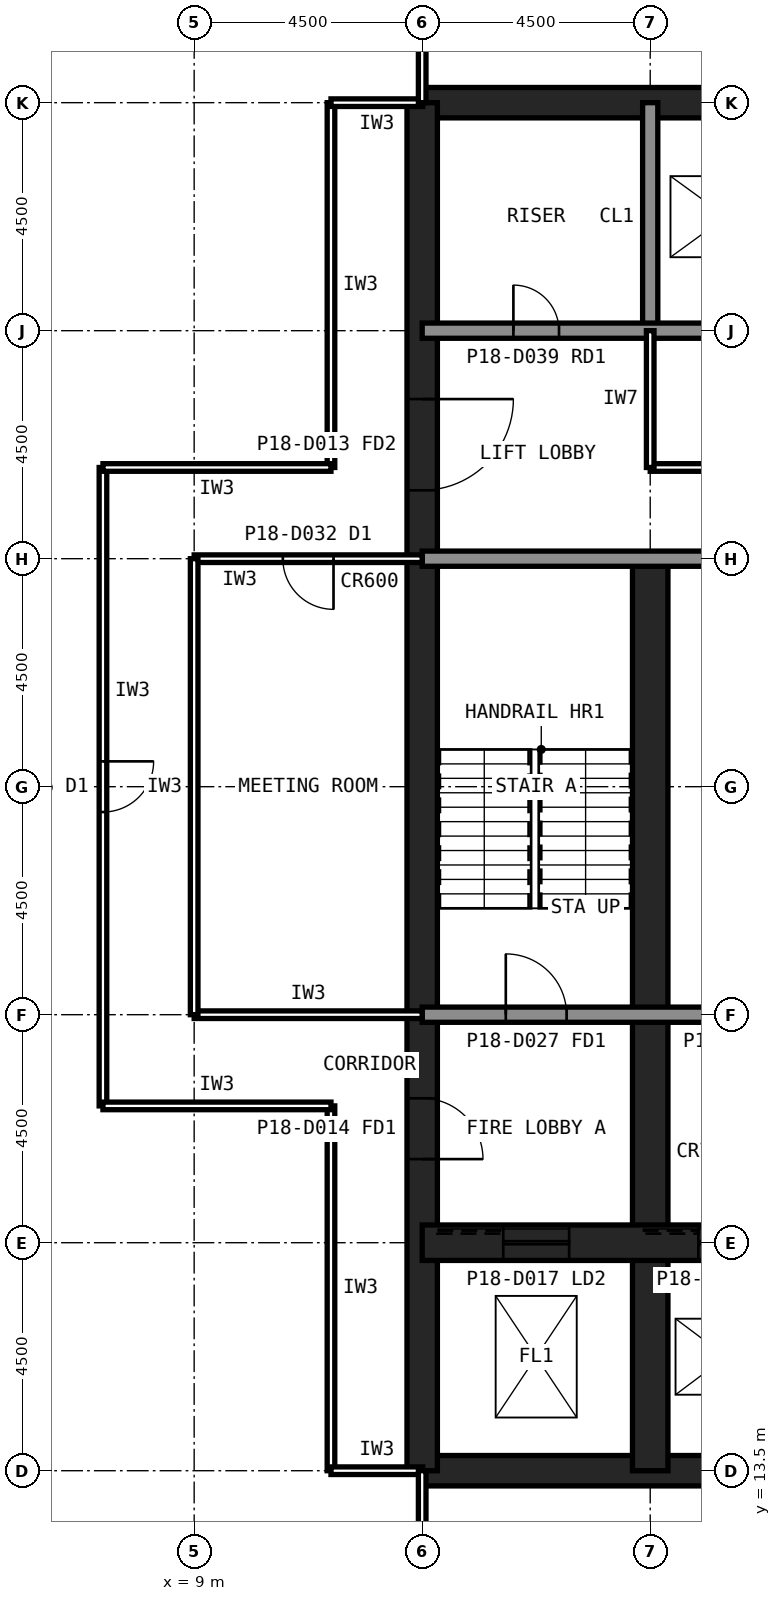
"""IFC4 building model, lengths in metres.
Left out: names, types, materials, properties, quantities, classifications, styles, units other than length and angle.
Written with IfcOpenShell. Run it as: python <this file> out.ifc"""

import sys

from ifc_helpers import new_model, si_unit, direction, frame, frame_2d, origin, place, context, subcontext, project, spatial, rectangle, extrude, element, fill, save


model = new_model("IFC4")
c1 = context("Model", 3, precision=1e-05, world=origin(), true_north=direction((0.0, 1.0)))
c2 = subcontext(c1, "Body", "Model", "MODEL_VIEW")
j1 = project(units=[si_unit("LENGTHUNIT", "METRE"), si_unit("PLANEANGLEUNIT", "RADIAN")], contexts=[c1])
p1 = place(None, origin())
s1 = spatial("IfcSite", under=j1, at=p1, CompositionType="ELEMENT")
p2 = place(p1, origin())
s2 = spatial("IfcBuilding", under=s1, at=p2, CompositionType="ELEMENT")
p3 = place(p2, frame((0.0, 0.0, 79.4)))
s3 = spatial("IfcBuildingStorey", under=s2, at=p3, CompositionType="ELEMENT", Elevation=79.4)
for number, where, z_axis, x_axis in (
    (1, (13.5, 13.5, 0.0), (0.0, 0.0, 1.0), (1.0, 0.0, 0.0)),
    (2, (40.5, 40.5, 0.0), (0.0, 0.0, 1.0), (-1.0, 0.0, 0.0)),
):
    element("IfcWall", number, at=place(p3, frame(where, z_axis=z_axis, x_axis=x_axis)), inside=s3, PredefinedType="SHEAR", context=c2, shape_type="SweptSolid", body=[
        extrude(rectangle(XDim=27.0, YDim=0.6, at=frame_2d((13.5, 0.0))), origin(), (0.0, 0.0, 1.0), 4.2),
    ])
p4 = place(p3, frame((13.5, 40.5, 0.0), z_axis=(0.0, 0.0, 1.0), x_axis=(0.0, -1.0, 0.0)))
e3 = element("IfcWall", 3, at=p4, inside=s3, PredefinedType="SHEAR", context=c2, shape_type="SweptSolid", body=[
    extrude(rectangle(XDim=27.0, YDim=0.6, at=frame_2d((13.5, 0.0))), origin(), (0.0, 0.0, 1.0), 4.2),
])
p5 = place(p4, frame((19.65, 0.0, 0.0)))
e4 = element("IfcOpeningElement", 4, at=p5, cuts=e3, PredefinedType="OPENING", context=c2, shape_type="SweptSolid", body=[
    extrude(rectangle(XDim=1.2, YDim=2.1, at=frame_2d((0.6, 1.05))), frame((0.0, 0.31, 0.0), z_axis=(0.0, -1.0, 0.0), x_axis=(1.0, 0.0, 0.0)), (0.0, 0.0, 1.0), 0.62),
])
p6 = place(p4, frame((5.85, 0.0, 0.0)))
e5 = element("IfcOpeningElement", 5, at=p6, cuts=e3, PredefinedType="OPENING", context=c2, shape_type="SweptSolid", body=[
    extrude(rectangle(XDim=1.8, YDim=2.1, at=frame_2d((0.9, 1.05))), frame((0.0, 0.31, 0.0), z_axis=(0.0, -1.0, 0.0), x_axis=(1.0, 0.0, 0.0)), (0.0, 0.0, 1.0), 0.62),
])
p7 = place(p3, frame((18.0, 13.5, 0.0), z_axis=(0.0, 0.0, 1.0), x_axis=(0.0, 1.0, 0.0)))
e6 = element("IfcWall", 6, at=p7, inside=s3, PredefinedType="SHEAR", context=c2, shape_type="SweptSolid", body=[
    extrude(rectangle(XDim=18.0, YDim=0.7, at=frame_2d((9.0, 0.0))), origin(), (0.0, 0.0, 1.0), 4.2),
])
p8 = place(p3, frame((18.0, 36.0, 0.0), z_axis=(0.0, 0.0, 1.0), x_axis=(0.0, 1.0, 0.0)))
e7 = element("IfcWall", 7, at=p8, inside=s3, PredefinedType="SOLIDWALL", context=c2, shape_type="SweptSolid", body=[
    extrude(rectangle(XDim=4.5, YDim=0.3, at=frame_2d((2.25, 0.0))), origin(), (0.0, 0.0, 1.0), 4.04),
])
p9 = place(p3, frame((13.5, 18.0, 0.0), z_axis=(0.0, 0.0, 1.0), x_axis=(1.0, 0.0, 0.0)))
e8 = element("IfcWall", 8, at=p9, inside=s3, PredefinedType="SHEAR", context=c2, shape_type="SweptSolid", body=[
    extrude(rectangle(XDim=27.0, YDim=0.7, at=frame_2d((13.5, 0.0))), origin(), (0.0, 0.0, 1.0), 4.2),
])
p10 = place(p9, frame((24.3, 0.0, 0.0)))
e9 = element("IfcOpeningElement", 9, at=p10, cuts=e8, PredefinedType="OPENING", context=c2, shape_type="SweptSolid", body=[
    extrude(rectangle(XDim=0.9, YDim=2.1, at=frame_2d((0.45, 1.05))), frame((0.0, 0.36, 0.0), z_axis=(0.0, -1.0, 0.0), x_axis=(1.0, 0.0, 0.0)), (0.0, 0.0, 1.0), 0.72),
])
p11 = place(p9, frame((5.45, 0.0, 0.0)))
e10 = element("IfcOpeningElement", 10, at=p11, cuts=e8, PredefinedType="OPENING", context=c2, shape_type="SweptSolid", body=[
    extrude(rectangle(XDim=1.1, YDim=2.1, at=frame_2d((0.55, 1.05))), frame((0.0, 0.36, 0.0), z_axis=(0.0, -1.0, 0.0), x_axis=(1.0, 0.0, 0.0)), (0.0, 0.0, 1.0), 0.72),
])
p12 = place(p9, frame((8.45, 0.0, 0.0)))
e11 = element("IfcOpeningElement", 11, at=p12, cuts=e8, PredefinedType="OPENING", context=c2, shape_type="SweptSolid", body=[
    extrude(rectangle(XDim=1.1, YDim=2.1, at=frame_2d((0.55, 1.05))), frame((0.0, 0.36, 0.0), z_axis=(0.0, -1.0, 0.0), x_axis=(1.0, 0.0, 0.0)), (0.0, 0.0, 1.0), 0.72),
])
p13 = place(p9, frame((11.45, 0.0, 0.0)))
e12 = element("IfcOpeningElement", 12, at=p13, cuts=e8, PredefinedType="OPENING", context=c2, shape_type="SweptSolid", body=[
    extrude(rectangle(XDim=1.1, YDim=2.1, at=frame_2d((0.55, 1.05))), frame((0.0, 0.36, 0.0), z_axis=(0.0, -1.0, 0.0), x_axis=(1.0, 0.0, 0.0)), (0.0, 0.0, 1.0), 0.72),
])
p14 = place(p9, frame((14.45, 0.0, 0.0)))
e13 = element("IfcOpeningElement", 13, at=p14, cuts=e8, PredefinedType="OPENING", context=c2, shape_type="SweptSolid", body=[
    extrude(rectangle(XDim=1.1, YDim=2.1, at=frame_2d((0.55, 1.05))), frame((0.0, 0.36, 0.0), z_axis=(0.0, -1.0, 0.0), x_axis=(1.0, 0.0, 0.0)), (0.0, 0.0, 1.0), 0.72),
])
p15 = place(p9, frame((17.45, 0.0, 0.0)))
e14 = element("IfcOpeningElement", 14, at=p15, cuts=e8, PredefinedType="OPENING", context=c2, shape_type="SweptSolid", body=[
    extrude(rectangle(XDim=1.1, YDim=2.1, at=frame_2d((0.55, 1.05))), frame((0.0, 0.36, 0.0), z_axis=(0.0, -1.0, 0.0), x_axis=(1.0, 0.0, 0.0)), (0.0, 0.0, 1.0), 0.72),
])
p16 = place(p9, frame((20.45, 0.0, 0.0)))
e15 = element("IfcOpeningElement", 15, at=p16, cuts=e8, PredefinedType="OPENING", context=c2, shape_type="SweptSolid", body=[
    extrude(rectangle(XDim=1.1, YDim=2.1, at=frame_2d((0.55, 1.05))), frame((0.0, 0.36, 0.0), z_axis=(0.0, -1.0, 0.0), x_axis=(1.0, 0.0, 0.0)), (0.0, 0.0, 1.0), 0.72),
])
p17 = place(p9, frame((1.6, 0.0, 0.0)))
e16 = element("IfcOpeningElement", 16, at=p17, cuts=e8, PredefinedType="OPENING", context=c2, shape_type="SweptSolid", body=[
    extrude(rectangle(XDim=1.3, YDim=2.2, at=frame_2d((0.65, 1.1))), frame((0.0, 0.36, 0.0), z_axis=(0.0, -1.0, 0.0), x_axis=(1.0, 0.0, 0.0)), (0.0, 0.0, 1.0), 0.72),
])
p18 = place(p3, frame((13.5, 36.0, 0.0), z_axis=(0.0, 0.0, 1.0), x_axis=(1.0, 0.0, 0.0)))
e17 = element("IfcWall", 17, at=p18, inside=s3, PredefinedType="SOLIDWALL", context=c2, shape_type="SweptSolid", body=[
    extrude(rectangle(XDim=27.0, YDim=0.3, at=frame_2d((13.5, 0.0))), origin(), (0.0, 0.0, 1.0), 4.04),
])
p19 = place(p18, frame((1.8, 0.0, 0.0)))
e18 = element("IfcOpeningElement", 18, at=p19, cuts=e17, PredefinedType="OPENING", context=c2, shape_type="SweptSolid", body=[
    extrude(rectangle(XDim=0.9, YDim=2.1, at=frame_2d((0.45, 1.05))), frame((0.0, 0.16, 0.0), z_axis=(0.0, -1.0, 0.0), x_axis=(1.0, 0.0, 0.0)), (0.0, 0.0, 1.0), 0.32),
])
p20 = place(p18, frame((24.1, 0.0, 0.0)))
e19 = element("IfcOpeningElement", 19, at=p20, cuts=e17, PredefinedType="OPENING", context=c2, shape_type="SweptSolid", body=[
    extrude(rectangle(XDim=1.3, YDim=2.2, at=frame_2d((0.65, 1.1))), frame((0.0, 0.16, 0.0), z_axis=(0.0, -1.0, 0.0), x_axis=(1.0, 0.0, 0.0)), (0.0, 0.0, 1.0), 0.32),
])
p21 = place(p3, frame((13.5, 22.5, 0.0), z_axis=(0.0, 0.0, 1.0), x_axis=(1.0, 0.0, 0.0)))
e20 = element("IfcWall", 20, at=p21, inside=s3, PredefinedType="SOLIDWALL", context=c2, shape_type="SweptSolid", body=[
    extrude(rectangle(XDim=27.0, YDim=0.3, at=frame_2d((13.5, 0.0))), origin(), (0.0, 0.0, 1.0), 4.04),
])
p22 = place(p21, frame((1.65, 0.0, 0.0)))
e21 = element("IfcOpeningElement", 21, at=p22, cuts=e20, PredefinedType="OPENING", context=c2, shape_type="SweptSolid", body=[
    extrude(rectangle(XDim=1.2, YDim=2.1, at=frame_2d((0.6, 1.05))), frame((0.0, 0.16, 0.0), z_axis=(0.0, -1.0, 0.0), x_axis=(1.0, 0.0, 0.0)), (0.0, 0.0, 1.0), 0.32),
])
p23 = place(p21, frame((6.025, 0.0, 0.0)))
e22 = element("IfcOpeningElement", 22, at=p23, cuts=e20, PredefinedType="OPENING", context=c2, shape_type="SweptSolid", body=[
    extrude(rectangle(XDim=1.0, YDim=2.1, at=frame_2d((0.5, 1.05))), frame((0.0, 0.16, 0.0), z_axis=(0.0, -1.0, 0.0), x_axis=(1.0, 0.0, 0.0)), (0.0, 0.0, 1.0), 0.32),
])
p24 = place(p21, frame((10.525, 0.0, 0.0)))
e23 = element("IfcOpeningElement", 23, at=p24, cuts=e20, PredefinedType="OPENING", context=c2, shape_type="SweptSolid", body=[
    extrude(rectangle(XDim=1.0, YDim=2.1, at=frame_2d((0.5, 1.05))), frame((0.0, 0.16, 0.0), z_axis=(0.0, -1.0, 0.0), x_axis=(1.0, 0.0, 0.0)), (0.0, 0.0, 1.0), 0.32),
])
p25 = place(p21, frame((19.75, 0.0, 0.0)))
e24 = element("IfcOpeningElement", 24, at=p25, cuts=e20, PredefinedType="OPENING", context=c2, shape_type="SweptSolid", body=[
    extrude(rectangle(XDim=1.0, YDim=2.1, at=frame_2d((0.5, 1.05))), frame((0.0, 0.16, 0.0), z_axis=(0.0, -1.0, 0.0), x_axis=(1.0, 0.0, 0.0)), (0.0, 0.0, 1.0), 0.32),
])
p26 = place(p21, frame((15.05, 0.0, 0.0)))
e25 = element("IfcOpeningElement", 25, at=p26, cuts=e20, PredefinedType="OPENING", context=c2, shape_type="SweptSolid", body=[
    extrude(rectangle(XDim=1.4, YDim=2.4, at=frame_2d((0.7, 1.2))), frame((0.0, 0.16, 0.0), z_axis=(0.0, -1.0, 0.0), x_axis=(1.0, 0.0, 0.0)), (0.0, 0.0, 1.0), 0.32),
])
p27 = place(p3, frame((13.5, 31.5, 0.0), z_axis=(0.0, 0.0, 1.0), x_axis=(1.0, 0.0, 0.0)))
e26 = element("IfcWall", 26, at=p27, inside=s3, PredefinedType="SOLIDWALL", context=c2, shape_type="SweptSolid", body=[
    extrude(rectangle(XDim=27.0, YDim=0.3, at=frame_2d((13.5, 0.0))), origin(), (0.0, 0.0, 1.0), 4.04),
])
p28 = place(p27, frame((24.15, 0.0, 0.0)))
e27 = element("IfcOpeningElement", 27, at=p28, cuts=e26, PredefinedType="OPENING", context=c2, shape_type="SweptSolid", body=[
    extrude(rectangle(XDim=1.2, YDim=2.1, at=frame_2d((0.6, 1.05))), frame((0.0, 0.16, 0.0), z_axis=(0.0, -1.0, 0.0), x_axis=(1.0, 0.0, 0.0)), (0.0, 0.0, 1.0), 0.32),
])
p29 = place(p27, frame((15.3, 0.0, 0.0)))
e28 = element("IfcOpeningElement", 28, at=p29, cuts=e26, PredefinedType="OPENING", context=c2, shape_type="SweptSolid", body=[
    extrude(rectangle(XDim=0.9, YDim=2.1, at=frame_2d((0.45, 1.05))), frame((0.0, 0.16, 0.0), z_axis=(0.0, -1.0, 0.0), x_axis=(1.0, 0.0, 0.0)), (0.0, 0.0, 1.0), 0.32),
])
p30 = place(p27, frame((19.8, 0.0, 0.0)))
e29 = element("IfcOpeningElement", 29, at=p30, cuts=e26, PredefinedType="OPENING", context=c2, shape_type="SweptSolid", body=[
    extrude(rectangle(XDim=0.9, YDim=2.1, at=frame_2d((0.45, 1.05))), frame((0.0, 0.16, 0.0), z_axis=(0.0, -1.0, 0.0), x_axis=(1.0, 0.0, 0.0)), (0.0, 0.0, 1.0), 0.32),
])
p31 = place(p3, frame((18.0, 33.3, 0.0), z_axis=(0.0, 0.0, 1.0), x_axis=(1.0, 0.0, 0.0)))
e30 = element("IfcWall", 30, at=p31, inside=s3, PredefinedType="PARTITIONING", context=c2, shape_type="SweptSolid", body=[
    extrude(rectangle(XDim=18.0, YDim=0.15, at=frame_2d((9.0, 0.0))), origin(), (0.0, 0.0, 1.0), 4.04),
])
p32 = place(p31, frame((5.55, 0.0, 0.0)))
e31 = element("IfcOpeningElement", 31, at=p32, cuts=e30, PredefinedType="OPENING", context=c2, shape_type="SweptSolid", body=[
    extrude(rectangle(XDim=0.9, YDim=2.1, at=frame_2d((0.45, 1.05))), frame((0.0, 0.085, 0.0), z_axis=(0.0, -1.0, 0.0), x_axis=(1.0, 0.0, 0.0)), (0.0, 0.0, 1.0), 0.17),
])
p33 = place(p31, frame((14.55, 0.0, 0.0)))
e32 = element("IfcOpeningElement", 32, at=p33, cuts=e30, PredefinedType="OPENING", context=c2, shape_type="SweptSolid", body=[
    extrude(rectangle(XDim=0.9, YDim=2.1, at=frame_2d((0.45, 1.05))), frame((0.0, 0.085, 0.0), z_axis=(0.0, -1.0, 0.0), x_axis=(1.0, 0.0, 0.0)), (0.0, 0.0, 1.0), 0.17),
])
p34 = place(p3, frame((18.0, 33.3, 0.0), z_axis=(0.0, 0.0, 1.0), x_axis=(0.0, 1.0, 0.0)))
e33 = element("IfcWall", 33, at=p34, inside=s3, PredefinedType="PARTITIONING", context=c2, shape_type="SweptSolid", body=[
    extrude(rectangle(XDim=2.7, YDim=0.15, at=frame_2d((1.35, 0.0))), origin(), (0.0, 0.0, 1.0), 4.04),
])
p35 = place(p3, frame((7.2, 33.3, 0.0), z_axis=(0.0, 0.0, 1.0), x_axis=(0.0, -1.0, 0.0)))
e34 = element("IfcWall", 34, at=p35, inside=s3, PredefinedType="PARTITIONING", context=c2, shape_type="SweptSolid", body=[
    extrude(rectangle(XDim=12.6, YDim=0.15, at=frame_2d((6.3, 0.0))), origin(), (0.0, 0.0, 1.0), 4.04),
])
p36 = place(p35, frame((5.8, 0.0, 0.0)))
e35 = element("IfcOpeningElement", 35, at=p36, cuts=e34, PredefinedType="OPENING", context=c2, shape_type="SweptSolid", body=[
    extrude(rectangle(XDim=1.0, YDim=2.1, at=frame_2d((0.5, 1.05))), frame((0.0, 0.085, 0.0), z_axis=(0.0, -1.0, 0.0), x_axis=(1.0, 0.0, 0.0)), (0.0, 0.0, 1.0), 0.17),
])
for number, where, z_axis, x_axis in (
    (36, (11.7, 20.7, 0.0), (0.0, 0.0, 1.0), (0.0, -1.0, 0.0)),
    (37, (11.7, 40.5, 0.0), (0.0, 0.0, 1.0), (0.0, -1.0, 0.0)),
):
    element("IfcWall", number, at=place(p3, frame(where, z_axis=z_axis, x_axis=x_axis)), inside=s3, PredefinedType="PARTITIONING", context=c2, shape_type="SweptSolid", body=[
        extrude(rectangle(XDim=7.2, YDim=0.15, at=frame_2d((3.6, 0.0))), origin(), (0.0, 0.0, 1.0), 4.04),
    ])
for number, where, z_axis, x_axis in (
    (38, (7.2, 20.7, 0.0), (0.0, 0.0, 1.0), (1.0, 0.0, 0.0)),
    (39, (11.7, 33.3, 0.0), (0.0, 0.0, 1.0), (-1.0, 0.0, 0.0)),
):
    element("IfcWall", number, at=place(p3, frame(where, z_axis=z_axis, x_axis=x_axis)), inside=s3, PredefinedType="PARTITIONING", context=c2, shape_type="SweptSolid", body=[
        extrude(rectangle(XDim=4.5, YDim=0.15, at=frame_2d((2.25, 0.0))), origin(), (0.0, 0.0, 1.0), 4.04),
    ])
for number, where, z_axis, x_axis in (
    (40, (11.7, 13.5, 0.0), (0.0, 0.0, 1.0), (1.0, 0.0, 0.0)),
    (41, (13.51, 40.5, 0.0), (0.0, 0.0, 1.0), (-1.0, 0.0, 0.0)),
):
    element("IfcWall", number, at=place(p3, frame(where, z_axis=z_axis, x_axis=x_axis)), inside=s3, PredefinedType="PARTITIONING", context=c2, shape_type="SweptSolid", body=[
        extrude(rectangle(XDim=1.81, YDim=0.15, at=frame_2d((0.905, 0.0))), origin(), (0.0, 0.0, 1.0), 3.189),
    ])
p37 = place(p3, frame((9.0, 22.5, 0.0), z_axis=(0.0, 0.0, 1.0), x_axis=(1.0, 0.0, 0.0)))
e42 = element("IfcWall", 42, at=p37, inside=s3, PredefinedType="PARTITIONING", context=c2, shape_type="SweptSolid", body=[
    extrude(rectangle(XDim=4.5, YDim=0.15, at=frame_2d((2.25, 0.0))), origin(), (0.0, 0.0, 1.0), 3.189),
])
p38 = place(p3, frame((13.5, 31.5, 0.0), z_axis=(0.0, 0.0, 1.0), x_axis=(-1.0, 0.0, 0.0)))
e43 = element("IfcWall", 43, at=p38, inside=s3, PredefinedType="PARTITIONING", context=c2, shape_type="SweptSolid", body=[
    extrude(rectangle(XDim=4.5, YDim=0.15, at=frame_2d((2.25, 0.0))), origin(), (0.0, 0.0, 1.0), 3.189),
])
p39 = place(p38, frame((1.75, 0.0, 0.0)))
e44 = element("IfcOpeningElement", 44, at=p39, cuts=e43, PredefinedType="OPENING", context=c2, shape_type="SweptSolid", body=[
    extrude(rectangle(XDim=1.0, YDim=2.1, at=frame_2d((0.5, 1.05))), frame((0.0, 0.085, 0.0), z_axis=(0.0, -1.0, 0.0), x_axis=(1.0, 0.0, 0.0)), (0.0, 0.0, 1.0), 0.17),
])
p40 = place(p3, frame((9.0, 31.5, 0.0), z_axis=(0.0, 0.0, 1.0), x_axis=(0.0, -1.0, 0.0)))
e45 = element("IfcWall", 45, at=p40, inside=s3, PredefinedType="PARTITIONING", context=c2, shape_type="SweptSolid", body=[
    extrude(rectangle(XDim=9.0, YDim=0.15, at=frame_2d((4.5, 0.0))), origin(), (0.0, 0.0, 1.0), 4.04),
])
p41 = place(p3, frame((13.5, 40.5, 0.0), z_axis=(0.0, 0.0, 1.0), x_axis=(0.0, 1.0, 0.0)))
e46 = element("IfcWall", 46, at=p41, inside=s3, PredefinedType="PARTITIONING", context=c2, shape_type="SweptSolid", body=[
    extrude(rectangle(XDim=13.055, YDim=0.15, at=frame_2d((6.527, 0.0))), origin(), (0.0, 0.0, 1.0), 3.189),
])
p42 = place(p41, frame((6.028, 0.0, 0.0)))
e47 = element("IfcOpeningElement", 47, at=p42, cuts=e46, PredefinedType="OPENING", context=c2, shape_type="SweptSolid", body=[
    extrude(rectangle(XDim=1.0, YDim=2.1, at=frame_2d((0.5, 1.05))), frame((0.0, 0.085, 0.0), z_axis=(0.0, -1.0, 0.0), x_axis=(1.0, 0.0, 0.0)), (0.0, 0.0, 1.0), 0.17),
])
p43 = place(p3, frame((13.5, 5.4, 0.0), z_axis=(0.0, 0.0, 1.0), x_axis=(0.0, 1.0, 0.0)))
e48 = element("IfcWall", 48, at=p43, inside=s3, PredefinedType="PARTITIONING", context=c2, shape_type="SweptSolid", body=[
    extrude(rectangle(XDim=8.1, YDim=0.15, at=frame_2d((4.05, 0.0))), origin(), (0.0, 0.0, 1.0), 3.189),
])
p44 = place(p43, frame((3.55, 0.0, 0.0)))
e49 = element("IfcOpeningElement", 49, at=p44, cuts=e48, PredefinedType="OPENING", context=c2, shape_type="SweptSolid", body=[
    extrude(rectangle(XDim=1.0, YDim=2.1, at=frame_2d((0.5, 1.05))), frame((0.0, 0.085, 0.0), z_axis=(0.0, -1.0, 0.0), x_axis=(1.0, 0.0, 0.0)), (0.0, 0.0, 1.0), 0.17),
])
p45 = place(p5, origin())
e50 = element("IfcDoor", 50, at=p45, inside=s3, OperationType="SINGLE_SWING_RIGHT", PredefinedType="DOOR", context=c2, shape_type="SweptSolid", body=[
    extrude(rectangle(XDim=1.2, YDim=2.1, at=frame_2d((0.6, 1.05))), frame((0.0, 0.025, 0.0), z_axis=(0.0, -1.0, 0.0), x_axis=(1.0, 0.0, 0.0)), (0.0, 0.0, 1.0), 0.05),
])
fill(e4, e50)
p46 = place(p6, origin())
e51 = element("IfcDoor", 51, at=p46, inside=s3, OperationType="SINGLE_SWING_LEFT", PredefinedType="DOOR", context=c2, shape_type="SweptSolid", body=[
    extrude(rectangle(XDim=1.8, YDim=2.1, at=frame_2d((0.9, 1.05))), frame((0.0, 0.025, 0.0), z_axis=(0.0, -1.0, 0.0), x_axis=(1.0, 0.0, 0.0)), (0.0, 0.0, 1.0), 0.05),
])
fill(e5, e51)
p47 = place(p22, origin())
e52 = element("IfcDoor", 52, at=p47, inside=s3, OperationType="SINGLE_SWING_LEFT", PredefinedType="DOOR", context=c2, shape_type="SweptSolid", body=[
    extrude(rectangle(XDim=1.2, YDim=2.1, at=frame_2d((0.6, 1.05))), frame((0.0, 0.025, 0.0), z_axis=(0.0, -1.0, 0.0), x_axis=(1.0, 0.0, 0.0)), (0.0, 0.0, 1.0), 0.05),
])
fill(e21, e52)
p48 = place(p19, origin())
e53 = element("IfcDoor", 53, at=p48, inside=s3, OperationType="SINGLE_SWING_LEFT", PredefinedType="DOOR", context=c2, shape_type="SweptSolid", body=[
    extrude(rectangle(XDim=0.9, YDim=2.1, at=frame_2d((0.45, 1.05))), frame((0.0, 0.025, 0.0), z_axis=(0.0, -1.0, 0.0), x_axis=(1.0, 0.0, 0.0)), (0.0, 0.0, 1.0), 0.05),
])
fill(e18, e53)
p49 = place(p11, origin())
e54 = element("IfcDoor", 54, at=p49, inside=s3, OperationType="SLIDING_TO_LEFT", PredefinedType="DOOR", context=c2, shape_type="SweptSolid", body=[
    extrude(rectangle(XDim=1.1, YDim=2.1, at=frame_2d((0.55, 1.05))), frame((0.0, 0.025, 0.0), z_axis=(0.0, -1.0, 0.0), x_axis=(1.0, 0.0, 0.0)), (0.0, 0.0, 1.0), 0.05),
])
fill(e10, e54)
p50 = place(p17, origin())
e55 = element("IfcDoor", 55, at=p50, inside=s3, OperationType="SLIDING_TO_LEFT", PredefinedType="DOOR", context=c2, shape_type="SweptSolid", body=[
    extrude(rectangle(XDim=1.3, YDim=2.2, at=frame_2d((0.65, 1.1))), frame((0.0, 0.025, 0.0), z_axis=(0.0, -1.0, 0.0), x_axis=(1.0, 0.0, 0.0)), (0.0, 0.0, 1.0), 0.05),
])
fill(e16, e55)
p51 = place(p36, origin())
e56 = element("IfcDoor", 56, at=p51, inside=s3, OperationType="SINGLE_SWING_LEFT", PredefinedType="DOOR", context=c2, shape_type="SweptSolid", body=[
    extrude(rectangle(XDim=1.0, YDim=2.1, at=frame_2d((0.5, 1.05))), frame((0.0, 0.025, 0.0), z_axis=(0.0, -1.0, 0.0), x_axis=(1.0, 0.0, 0.0)), (0.0, 0.0, 1.0), 0.05),
])
fill(e35, e56)
p52 = place(p39, origin())
e57 = element("IfcDoor", 57, at=p52, inside=s3, OperationType="SINGLE_SWING_LEFT", PredefinedType="DOOR", context=c2, shape_type="SweptSolid", body=[
    extrude(rectangle(XDim=1.0, YDim=2.1, at=frame_2d((0.5, 1.05))), frame((0.0, 0.025, 0.0), z_axis=(0.0, -1.0, 0.0), x_axis=(1.0, 0.0, 0.0)), (0.0, 0.0, 1.0), 0.05),
])
fill(e44, e57)
save(model, sys.argv[1])
